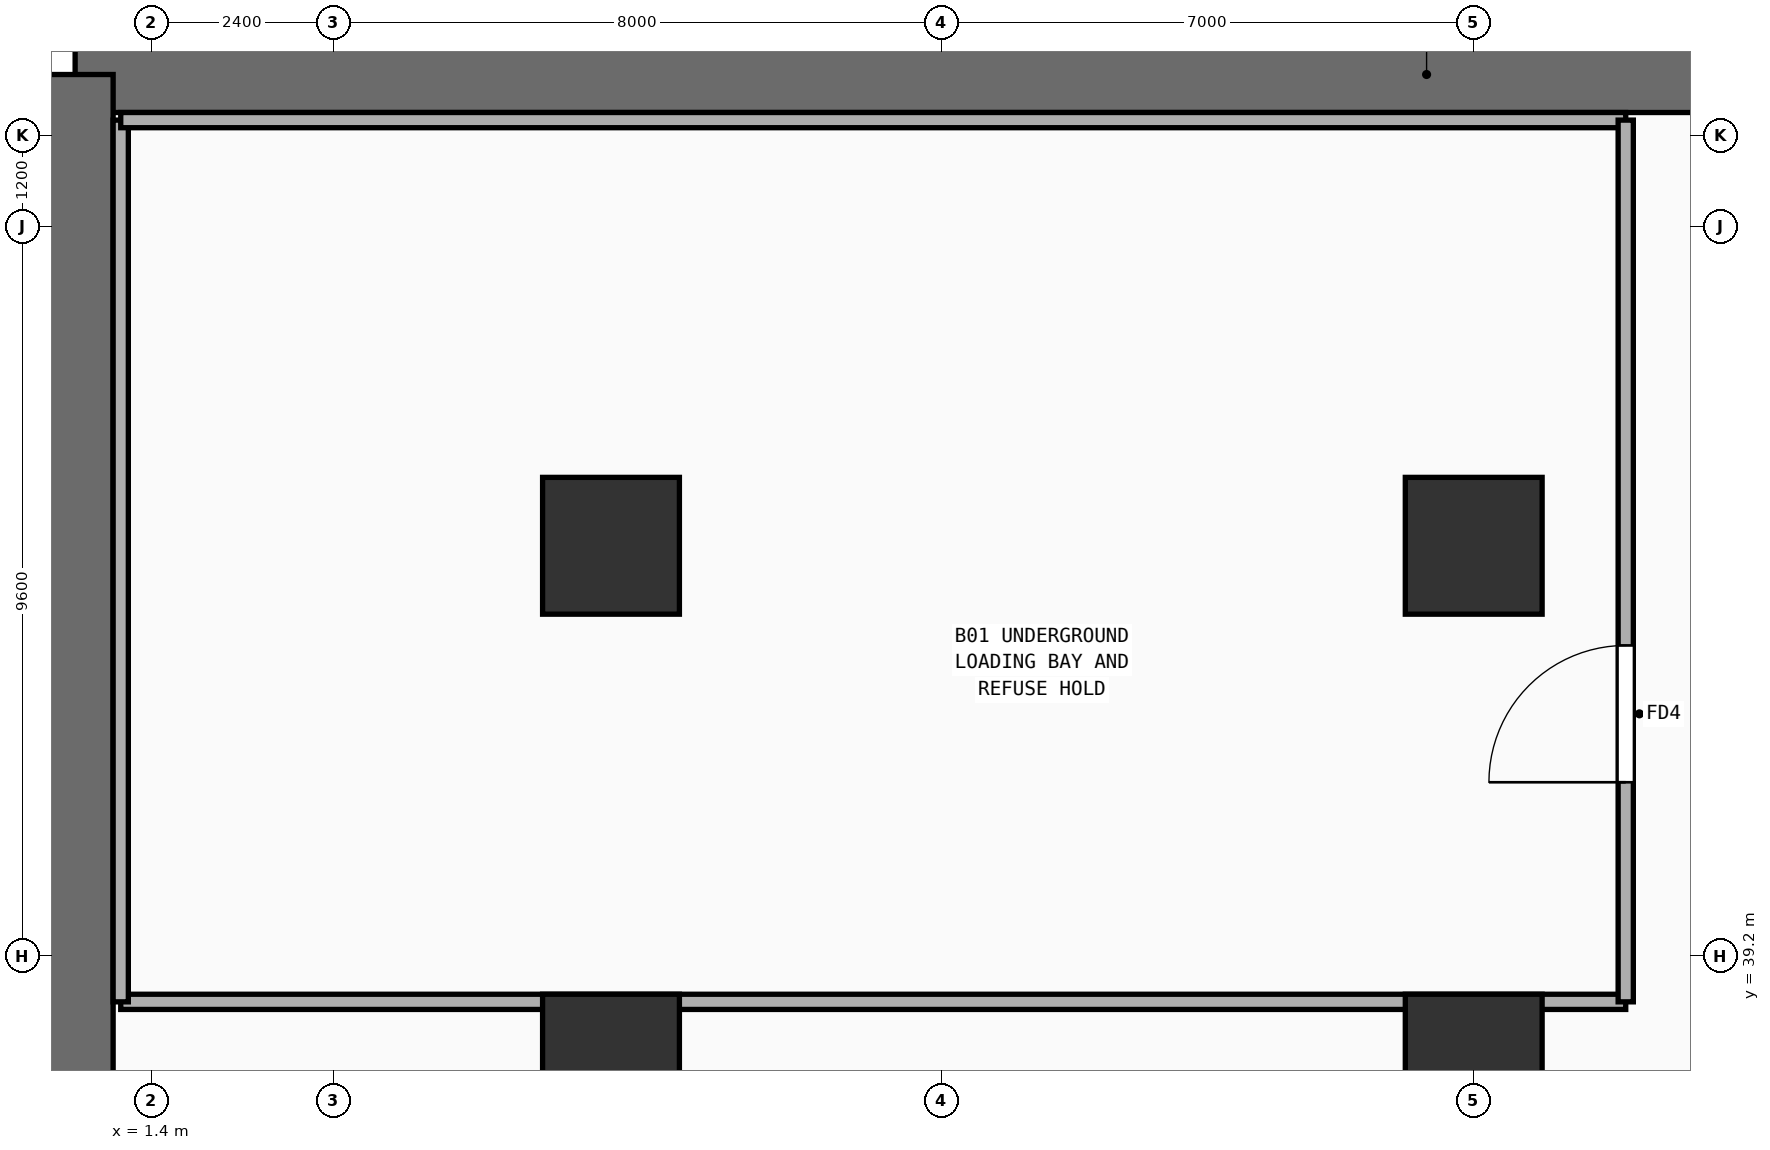
"""IFC4 building model, lengths in metres.
Left out: names, types, materials, properties, quantities, classifications, styles, units other than length and angle.
Written with IfcOpenShell. Run it as: python <this file> out.ifc"""

import sys

from ifc_helpers import new_model, si_unit, direction, frame, frame_2d, origin, origin_2d, place, context, subcontext, project, spatial, rectangle, extrude, element, fill, save


model = new_model("IFC4")
c1 = context("Model", 3, precision=1e-05, world=origin(), true_north=direction((0.0, 1.0)))
c2 = subcontext(c1, "Body", "Model", "MODEL_VIEW")
j1 = project(units=[si_unit("LENGTHUNIT", "METRE"), si_unit("PLANEANGLEUNIT", "RADIAN")], contexts=[c1])
p1 = place(None, origin())
s1 = spatial("IfcSite", under=j1, at=p1, CompositionType="ELEMENT")
p2 = place(p1, origin())
s2 = spatial("IfcBuilding", under=s1, at=p2, CompositionType="ELEMENT")
p3 = place(p2, frame((0.0, 0.0, -4.2)))
s3 = spatial("IfcBuildingStorey", under=s2, at=p3, CompositionType="ELEMENT", Elevation=-4.2)
p4 = place(p3, frame((64.4, 50.8, 0.0), z_axis=(0.0, 0.0, 1.0), x_axis=(-1.0, 0.0, 0.0)))
e1 = element("IfcWall", 1, at=p4, inside=s3, PredefinedType="USERDEFINED", context=c2, shape_type="SweptSolid", body=[
    extrude(rectangle(XDim=64.0, YDim=1.0, at=frame_2d((32.0, 0.0))), origin(), (0.0, 0.0, 1.0), 3.82),
])
p5 = place(p3, frame((0.4, 50.8, 0.0), z_axis=(0.0, 0.0, 1.0), x_axis=(0.0, -1.0, 0.0)))
e2 = element("IfcWall", 2, at=p5, inside=s3, PredefinedType="USERDEFINED", context=c2, shape_type="SweptSolid", body=[
    extrude(rectangle(XDim=50.4, YDim=1.0, at=frame_2d((25.2, 0.0))), origin(), (0.0, 0.0, 1.0), 3.82),
])
for number, where, z_axis, x_axis in (
    (3, (7.45, 37.8, 0.0), (0.0, 0.0, 1.0), (1.0, 0.0, 0.0)),
    (4, (7.45, 44.6, 0.0), (0.0, 0.0, 1.0), (1.0, 0.0, 0.0)),
    (5, (18.8, 37.8, 0.0), (0.0, 0.0, 1.0), (1.0, 0.0, 0.0)),
    (6, (18.8, 44.6, 0.0), (0.0, 0.0, 1.0), (1.0, 0.0, 0.0)),
):
    element("IfcColumn", number, at=place(p3, frame(where, z_axis=z_axis, x_axis=x_axis)), inside=s3, PredefinedType="COLUMN", context=c2, shape_type="SweptSolid", body=[
        extrude(rectangle(XDim=1.8, YDim=1.8, at=origin_2d()), origin(), (0.0, 0.0, 1.0), 3.82),
    ])
p6 = place(p3, frame((1.0, 38.6, 0.0), z_axis=(0.0, 0.0, 1.0), x_axis=(1.0, 0.0, 0.0)))
e7 = element("IfcWall", 7, at=p6, inside=s3, PredefinedType="PARTITIONING", context=c2, shape_type="SweptSolid", body=[
    extrude(rectangle(XDim=19.8, YDim=0.2, at=frame_2d((9.9, 0.0))), origin(), (0.0, 0.0, 1.0), 3.82),
])
p7 = place(p3, frame((1.0, 38.6, 0.0), z_axis=(0.0, 0.0, 1.0), x_axis=(0.0, 1.0, 0.0)))
e8 = element("IfcWall", 8, at=p7, inside=s3, PredefinedType="PARTITIONING", context=c2, shape_type="SweptSolid", body=[
    extrude(rectangle(XDim=11.6, YDim=0.2, at=frame_2d((5.8, 0.0))), origin(), (0.0, 0.0, 1.0), 3.82),
])
p8 = place(p3, frame((1.0, 50.2, 0.0), z_axis=(0.0, 0.0, 1.0), x_axis=(1.0, 0.0, 0.0)))
e9 = element("IfcWall", 9, at=p8, inside=s3, PredefinedType="PARTITIONING", context=c2, shape_type="SweptSolid", body=[
    extrude(rectangle(XDim=19.8, YDim=0.2, at=frame_2d((9.9, 0.0))), origin(), (0.0, 0.0, 1.0), 3.82),
])
p9 = place(p3, frame((20.8, 38.6, 0.0), z_axis=(0.0, 0.0, 1.0), x_axis=(0.0, 1.0, 0.0)))
e10 = element("IfcWall", 10, at=p9, inside=s3, PredefinedType="PARTITIONING", context=c2, shape_type="SweptSolid", body=[
    extrude(rectangle(XDim=11.6, YDim=0.2, at=frame_2d((5.8, 0.0))), origin(), (0.0, 0.0, 1.0), 3.82),
])
p10 = place(p9, frame((2.889, 0.0, 0.0)))
e11 = element("IfcOpeningElement", 11, at=p10, cuts=e10, PredefinedType="OPENING", context=c2, shape_type="SweptSolid", body=[
    extrude(rectangle(XDim=1.8, YDim=2.4, at=frame_2d((0.9, 1.2))), frame((0.0, 0.11, 0.0), z_axis=(0.0, -1.0, 0.0), x_axis=(1.0, 0.0, 0.0)), (0.0, 0.0, 1.0), 0.22),
])
p11 = place(p10, origin())
e12 = element("IfcDoor", 12, at=p11, inside=s3, OperationType="SINGLE_SWING_LEFT", PredefinedType="DOOR", context=c2, shape_type="SweptSolid", body=[
    extrude(rectangle(XDim=1.8, YDim=2.4, at=frame_2d((0.9, 1.2))), frame((0.0, 0.025, 0.0), z_axis=(0.0, -1.0, 0.0), x_axis=(1.0, 0.0, 0.0)), (0.0, 0.0, 1.0), 0.05),
])
fill(e11, e12)
save(model, sys.argv[1])
